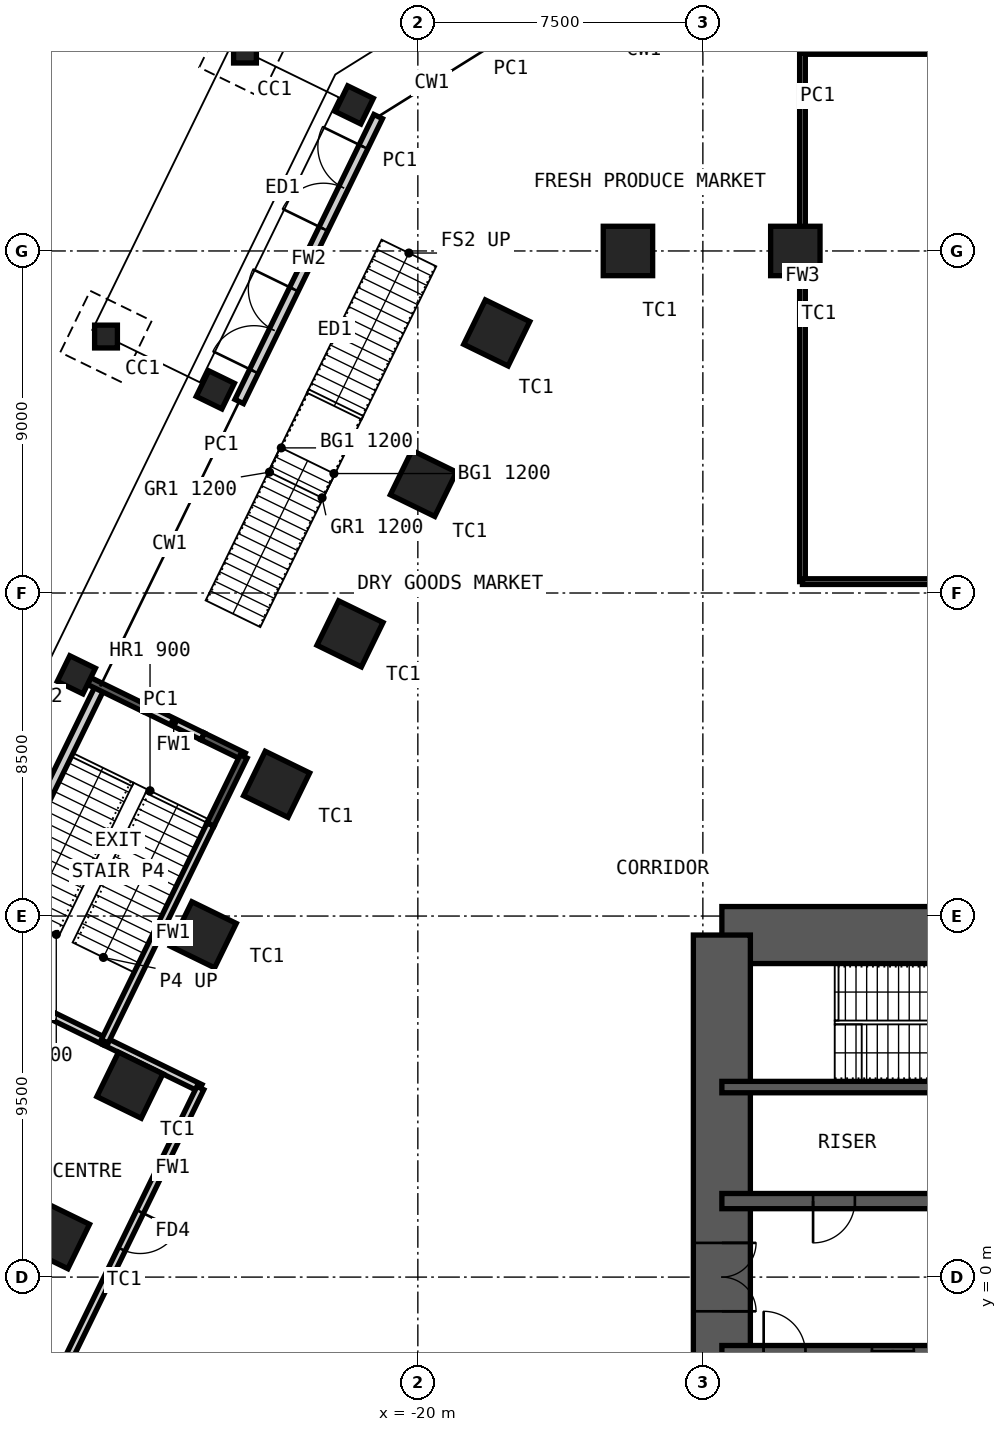
"""IFC4 building model, lengths in metres.
Left out: names, types, materials, properties, quantities, classifications, styles, units other than length and angle.
Written with IfcOpenShell. Run it as: python <this file> out.ifc"""

import sys

from ifc_helpers import new_model, si_unit, direction, frame, frame_2d, origin, origin_2d, place, context, subcontext, project, spatial, rectangle, hollow_rectangle, hollow_circle, extrude, element, fill, save


model = new_model("IFC4")
c1 = context("Model", 3, precision=1e-05, world=origin(), true_north=direction((0.0, 1.0)))
c2 = subcontext(c1, "Body", "Model", "MODEL_VIEW")
j1 = project(units=[si_unit("LENGTHUNIT", "METRE"), si_unit("PLANEANGLEUNIT", "RADIAN")], contexts=[c1])
p1 = place(None, origin())
s1 = spatial("IfcSite", under=j1, at=p1, CompositionType="ELEMENT")
p2 = place(p1, origin())
s2 = spatial("IfcBuilding", under=s1, at=p2, CompositionType="ELEMENT")
p3 = place(p2, origin())
s3 = spatial("IfcBuildingStorey", under=s2, at=p3, CompositionType="ELEMENT", Elevation=0.0)
for number, where, z_axis, x_axis in (
    (1, (-14.471, 27.0, 0.0), (0.0, 0.0, 1.0), (-1.0, 0.0, 0.0)),
    (2, (-10.067, 27.0, 0.0), (0.0, 0.0, 1.0), (-1.0, 0.0, 0.0)),
    (3, (-29.509, 1.09, 0.0), (0.0, 0.0, 1.0), (-0.438, -0.899, 0.0)),
    (4, (-27.578, 5.049, 0.0), (0.0, 0.0, 1.0), (-0.438, -0.899, 0.0)),
    (5, (-25.647, 9.008, 0.0), (0.0, 0.0, 1.0), (-0.438, -0.899, 0.0)),
    (6, (-23.716, 12.966, 0.0), (0.0, 0.0, 1.0), (-0.438, -0.899, 0.0)),
    (7, (-21.785, 16.925, 0.0), (0.0, 0.0, 1.0), (-0.438, -0.899, 0.0)),
    (8, (-19.854, 20.884, 0.0), (0.0, 0.0, 1.0), (-0.438, -0.899, 0.0)),
    (9, (-17.924, 24.843, 0.0), (0.0, 0.0, 1.0), (-0.438, -0.899, 0.0)),
):
    element("IfcColumn", number, at=place(p3, frame(where, z_axis=z_axis, x_axis=x_axis)), inside=s3, PredefinedType="COLUMN", context=c2, shape_type="SweptSolid", body=[
        extrude(hollow_rectangle(XDim=1.3, YDim=1.3, WallThickness=0.1, at=origin_2d()), origin(), (0.0, 0.0, 1.0), 6.0),
    ])
for number, where, z_axis, x_axis in (
    (10, (-28.986, 15.848, 0.0), (0.0, 0.0, 1.0), (-0.438, -0.899, 0.0)),
    (11, (-25.33, 23.345, 0.0), (0.0, 0.0, 1.0), (-0.438, -0.899, 0.0)),
    (12, (-21.673, 30.843, 0.0), (0.0, 0.0, 1.0), (-0.438, -0.899, 0.0)),
):
    element("IfcColumn", number, at=place(p3, frame(where, z_axis=z_axis, x_axis=x_axis)), inside=s3, PredefinedType="COLUMN", context=c2, shape_type="SweptSolid", body=[
        extrude(hollow_rectangle(XDim=0.75, YDim=0.75, WallThickness=0.036, at=origin_2d()), origin(), (0.0, 0.0, 1.0), 6.0),
    ])
p4 = place(p3, frame((-12.0, 9.0, 0.0), z_axis=(0.0, 0.0, 1.0), x_axis=(1.0, 0.0, 0.0)))
e13 = element("IfcWall", 13, at=p4, inside=s3, PredefinedType="SHEAR", context=c2, shape_type="SweptSolid", body=[
    extrude(rectangle(XDim=24.0, YDim=1.5, at=frame_2d((12.0, 0.0))), origin(), (0.0, 0.0, 1.0), 6.0),
])
p5 = place(p4, frame((10.4, 0.0, 0.0)))
e14 = element("IfcOpeningElement", 14, at=p5, cuts=e13, PredefinedType="OPENING", context=c2, shape_type="SweptSolid", body=[
    extrude(rectangle(XDim=1.0, YDim=2.1, at=frame_2d((0.5, 1.05))), frame((0.0, 0.76, 0.0), z_axis=(0.0, -1.0, 0.0), x_axis=(1.0, 0.0, 0.0)), (0.0, 0.0, 1.0), 1.52),
])
p6 = place(p4, frame((17.6, 0.0, 0.0)))
e15 = element("IfcOpeningElement", 15, at=p6, cuts=e13, PredefinedType="OPENING", context=c2, shape_type="SweptSolid", body=[
    extrude(rectangle(XDim=0.9, YDim=2.1, at=frame_2d((0.45, 1.05))), frame((0.0, 0.76, 0.0), z_axis=(0.0, -1.0, 0.0), x_axis=(1.0, 0.0, 0.0)), (0.0, 0.0, 1.0), 1.52),
])
p7 = place(p4, frame((21.9, 0.0, 0.0)))
e16 = element("IfcOpeningElement", 16, at=p7, cuts=e13, PredefinedType="OPENING", context=c2, shape_type="SweptSolid", body=[
    extrude(rectangle(XDim=0.9, YDim=2.1, at=frame_2d((0.45, 1.05))), frame((0.0, 0.76, 0.0), z_axis=(0.0, -1.0, 0.0), x_axis=(1.0, 0.0, 0.0)), (0.0, 0.0, 1.0), 1.52),
])
p8 = place(p3, frame((-12.0, -9.0, 0.0), z_axis=(0.0, 0.0, 1.0), x_axis=(0.0, 1.0, 0.0)))
e17 = element("IfcWall", 17, at=p8, inside=s3, PredefinedType="SHEAR", context=c2, shape_type="SweptSolid", body=[
    extrude(rectangle(XDim=18.0, YDim=1.5, at=frame_2d((9.0, 0.0))), origin(), (0.0, 0.0, 1.0), 6.0),
])
p9 = place(p8, frame((8.1, 0.0, 0.0)))
e18 = element("IfcOpeningElement", 18, at=p9, cuts=e17, PredefinedType="OPENING", context=c2, shape_type="SweptSolid", body=[
    extrude(rectangle(XDim=1.8, YDim=2.1, at=frame_2d((0.9, 1.05))), frame((0.0, 0.76, 0.0), z_axis=(0.0, -1.0, 0.0), x_axis=(1.0, 0.0, 0.0)), (0.0, 0.0, 1.0), 1.52),
])
p10 = place(p3, frame((-12.0, 5.0, 0.0), z_axis=(0.0, 0.0, 1.0), x_axis=(1.0, 0.0, 0.0)))
e19 = element("IfcWall", 19, at=p10, inside=s3, PredefinedType="SHEAR", context=c2, shape_type="SweptSolid", body=[
    extrude(rectangle(XDim=24.0, YDim=0.3, at=frame_2d((12.0, 0.0))), origin(), (0.0, 0.0, 1.0), 6.0),
])
p11 = place(p3, frame((-12.0, 2.0, 0.0), z_axis=(0.0, 0.0, 1.0), x_axis=(1.0, 0.0, 0.0)))
e20 = element("IfcWall", 20, at=p11, inside=s3, PredefinedType="SHEAR", context=c2, shape_type="SweptSolid", body=[
    extrude(rectangle(XDim=24.0, YDim=0.4, at=frame_2d((12.0, 0.0))), origin(), (0.0, 0.0, 1.0), 6.0),
])
p12 = place(p11, frame((2.4, 0.0, 0.0)))
e21 = element("IfcOpeningElement", 21, at=p12, cuts=e20, PredefinedType="OPENING", context=c2, shape_type="SweptSolid", body=[
    extrude(rectangle(XDim=1.1, YDim=2.1, at=frame_2d((0.55, 1.05))), frame((0.0, 0.21, 0.0), z_axis=(0.0, -1.0, 0.0), x_axis=(1.0, 0.0, 0.0)), (0.0, 0.0, 1.0), 0.42),
])
p13 = place(p11, frame((22.0, 0.0, 0.0)))
e22 = element("IfcOpeningElement", 22, at=p13, cuts=e20, PredefinedType="OPENING", context=c2, shape_type="SweptSolid", body=[
    extrude(rectangle(XDim=1.1, YDim=2.1, at=frame_2d((0.55, 1.05))), frame((0.0, 0.21, 0.0), z_axis=(0.0, -1.0, 0.0), x_axis=(1.0, 0.0, 0.0)), (0.0, 0.0, 1.0), 0.42),
])
p14 = place(p11, frame((10.15, 0.0, 0.0)))
e23 = element("IfcOpeningElement", 23, at=p14, cuts=e20, PredefinedType="OPENING", context=c2, shape_type="SweptSolid", body=[
    extrude(rectangle(XDim=1.0, YDim=2.1, at=frame_2d((0.5, 1.05))), frame((0.0, 0.21, 0.0), z_axis=(0.0, -1.0, 0.0), x_axis=(1.0, 0.0, 0.0)), (0.0, 0.0, 1.0), 0.42),
])
p15 = place(p11, frame((6.7, 0.0, 0.0)))
e24 = element("IfcOpeningElement", 24, at=p15, cuts=e20, PredefinedType="OPENING", context=c2, shape_type="SweptSolid", body=[
    extrude(rectangle(XDim=1.4, YDim=2.4, at=frame_2d((0.7, 1.2))), frame((0.0, 0.21, 0.0), z_axis=(0.0, -1.0, 0.0), x_axis=(1.0, 0.0, 0.0)), (0.0, 0.0, 1.0), 0.42),
])
p16 = place(p11, frame((13.35, 0.0, 0.0)))
e25 = element("IfcOpeningElement", 25, at=p16, cuts=e20, PredefinedType="OPENING", context=c2, shape_type="SweptSolid", body=[
    extrude(rectangle(XDim=1.1, YDim=2.4, at=frame_2d((0.55, 1.2))), frame((0.0, 0.21, 0.0), z_axis=(0.0, -1.0, 0.0), x_axis=(1.0, 0.0, 0.0)), (0.0, 0.0, 1.0), 0.42),
])
p17 = place(p11, frame((16.15, 0.0, 0.0)))
e26 = element("IfcOpeningElement", 26, at=p17, cuts=e20, PredefinedType="OPENING", context=c2, shape_type="SweptSolid", body=[
    extrude(rectangle(XDim=1.1, YDim=2.4, at=frame_2d((0.55, 1.2))), frame((0.0, 0.21, 0.0), z_axis=(0.0, -1.0, 0.0), x_axis=(1.0, 0.0, 0.0)), (0.0, 0.0, 1.0), 0.42),
])
p18 = place(p11, frame((18.95, 0.0, 0.0)))
e27 = element("IfcOpeningElement", 27, at=p18, cuts=e20, PredefinedType="OPENING", context=c2, shape_type="SweptSolid", body=[
    extrude(rectangle(XDim=1.1, YDim=2.4, at=frame_2d((0.55, 1.2))), frame((0.0, 0.21, 0.0), z_axis=(0.0, -1.0, 0.0), x_axis=(1.0, 0.0, 0.0)), (0.0, 0.0, 1.0), 0.42),
])
p19 = place(p3, frame((-12.0, -2.0, 0.0), z_axis=(0.0, 0.0, 1.0), x_axis=(1.0, 0.0, 0.0)))
e28 = element("IfcWall", 28, at=p19, inside=s3, PredefinedType="SHEAR", context=c2, shape_type="SweptSolid", body=[
    extrude(rectangle(XDim=24.0, YDim=0.4, at=frame_2d((12.0, 0.0))), origin(), (0.0, 0.0, 1.0), 6.0),
])
p20 = place(p19, frame((1.1, 0.0, 0.0)))
e29 = element("IfcOpeningElement", 29, at=p20, cuts=e28, PredefinedType="OPENING", context=c2, shape_type="SweptSolid", body=[
    extrude(rectangle(XDim=1.1, YDim=2.1, at=frame_2d((0.55, 1.05))), frame((0.0, 0.21, 0.0), z_axis=(0.0, -1.0, 0.0), x_axis=(1.0, 0.0, 0.0)), (0.0, 0.0, 1.0), 0.42),
])
p21 = place(p19, frame((13.55, 0.0, 0.0)))
e30 = element("IfcOpeningElement", 30, at=p21, cuts=e28, PredefinedType="OPENING", context=c2, shape_type="SweptSolid", body=[
    extrude(rectangle(XDim=1.1, YDim=2.1, at=frame_2d((0.55, 1.05))), frame((0.0, 0.21, 0.0), z_axis=(0.0, -1.0, 0.0), x_axis=(1.0, 0.0, 0.0)), (0.0, 0.0, 1.0), 0.42),
])
p22 = place(p19, frame((20.7, 0.0, 0.0)))
e31 = element("IfcOpeningElement", 31, at=p22, cuts=e28, PredefinedType="OPENING", context=c2, shape_type="SweptSolid", body=[
    extrude(rectangle(XDim=1.1, YDim=2.1, at=frame_2d((0.55, 1.05))), frame((0.0, 0.21, 0.0), z_axis=(0.0, -1.0, 0.0), x_axis=(1.0, 0.0, 0.0)), (0.0, 0.0, 1.0), 0.42),
])
p23 = place(p19, frame((3.95, 0.0, 0.0)))
e32 = element("IfcOpeningElement", 32, at=p23, cuts=e28, PredefinedType="OPENING", context=c2, shape_type="SweptSolid", body=[
    extrude(rectangle(XDim=1.1, YDim=2.4, at=frame_2d((0.55, 1.2))), frame((0.0, 0.21, 0.0), z_axis=(0.0, -1.0, 0.0), x_axis=(1.0, 0.0, 0.0)), (0.0, 0.0, 1.0), 0.42),
])
p24 = place(p19, frame((6.75, 0.0, 0.0)))
e33 = element("IfcOpeningElement", 33, at=p24, cuts=e28, PredefinedType="OPENING", context=c2, shape_type="SweptSolid", body=[
    extrude(rectangle(XDim=1.1, YDim=2.4, at=frame_2d((0.55, 1.2))), frame((0.0, 0.21, 0.0), z_axis=(0.0, -1.0, 0.0), x_axis=(1.0, 0.0, 0.0)), (0.0, 0.0, 1.0), 0.42),
])
p25 = place(p19, frame((9.55, 0.0, 0.0)))
e34 = element("IfcOpeningElement", 34, at=p25, cuts=e28, PredefinedType="OPENING", context=c2, shape_type="SweptSolid", body=[
    extrude(rectangle(XDim=1.1, YDim=2.4, at=frame_2d((0.55, 1.2))), frame((0.0, 0.21, 0.0), z_axis=(0.0, -1.0, 0.0), x_axis=(1.0, 0.0, 0.0)), (0.0, 0.0, 1.0), 0.42),
])
p26 = place(p3, frame((-9.879, 32.3, 0.0), z_axis=(0.0, 0.0, 1.0), x_axis=(1.0, 0.0, 0.0)))
e35 = element("IfcWall", 35, at=p26, inside=s3, PredefinedType="SOLIDWALL", context=c2, shape_type="SweptSolid", body=[
    extrude(rectangle(XDim=8.342, YDim=0.25, at=frame_2d((4.171, 0.0))), origin(), (0.0, 0.0, 1.0), 5.75),
])
p27 = place(p26, frame((0.885, 0.0, 0.0)))
e36 = element("IfcOpeningElement", 36, at=p27, cuts=e35, PredefinedType="OPENING", context=c2, shape_type="SweptSolid", body=[
    extrude(rectangle(XDim=2.4, YDim=3.0, at=frame_2d((1.2, 1.5))), frame((0.0, 0.135, 0.0), z_axis=(0.0, -1.0, 0.0), x_axis=(1.0, 0.0, 0.0)), (0.0, 0.0, 1.0), 0.27),
])
p28 = place(p26, frame((5.056, 0.0, 0.0)))
e37 = element("IfcOpeningElement", 37, at=p28, cuts=e35, PredefinedType="OPENING", context=c2, shape_type="SweptSolid", body=[
    extrude(rectangle(XDim=2.4, YDim=3.0, at=frame_2d((1.2, 1.5))), frame((0.0, 0.135, 0.0), z_axis=(0.0, -1.0, 0.0), x_axis=(1.0, 0.0, 0.0)), (0.0, 0.0, 1.0), 0.27),
])
p29 = place(p3, frame((-32.014, 8.043, 0.0), z_axis=(0.0, 0.0, 1.0), x_axis=(0.438364815309, 0.898797134341, 0.0)))
e38 = element("IfcWall", 38, at=p29, inside=s3, PredefinedType="SOLIDWALL", context=c2, shape_type="SweptSolid", body=[
    extrude(rectangle(XDim=8.342, YDim=0.25, at=frame_2d((4.171, 0.0))), origin(), (0.0, 0.0, 1.0), 5.75),
])
p30 = place(p29, frame((3.171, 0.0, 0.0)))
e39 = element("IfcOpeningElement", 39, at=p30, cuts=e38, PredefinedType="OPENING", context=c2, shape_type="SweptSolid", body=[
    extrude(rectangle(XDim=2.0, YDim=2.4, at=frame_2d((1.0, 1.2))), frame((0.0, 0.135, 0.0), z_axis=(0.0, -1.0, 0.0), x_axis=(1.0, 0.0, 0.0)), (0.0, 0.0, 1.0), 0.27),
])
p31 = place(p3, frame((-24.7, 23.039, 0.0), z_axis=(0.0, 0.0, 1.0), x_axis=(0.438364815309, 0.898797134341, 0.0)))
e40 = element("IfcWall", 40, at=p31, inside=s3, PredefinedType="SOLIDWALL", context=c2, shape_type="SweptSolid", body=[
    extrude(rectangle(XDim=8.342, YDim=0.25, at=frame_2d((4.171, 0.0))), origin(), (0.0, 0.0, 1.0), 5.75),
])
p32 = place(p31, frame((0.885, 0.0, 0.0)))
e41 = element("IfcOpeningElement", 41, at=p32, cuts=e40, PredefinedType="OPENING", context=c2, shape_type="SweptSolid", body=[
    extrude(rectangle(XDim=2.4, YDim=3.0, at=frame_2d((1.2, 1.5))), frame((0.0, 0.135, 0.0), z_axis=(0.0, -1.0, 0.0), x_axis=(1.0, 0.0, 0.0)), (0.0, 0.0, 1.0), 0.27),
])
p33 = place(p31, frame((5.056, 0.0, 0.0)))
e42 = element("IfcOpeningElement", 42, at=p33, cuts=e40, PredefinedType="OPENING", context=c2, shape_type="SweptSolid", body=[
    extrude(rectangle(XDim=2.4, YDim=3.0, at=frame_2d((1.2, 1.5))), frame((0.0, 0.135, 0.0), z_axis=(0.0, -1.0, 0.0), x_axis=(1.0, 0.0, 0.0)), (0.0, 0.0, 1.0), 0.27),
])
p34 = place(p3, frame((-9.879, 32.2, 0.0), z_axis=(0.0, 0.0, 1.0), x_axis=(0.0, -1.0, 0.0)))
e43 = element("IfcWall", 43, at=p34, inside=s3, PredefinedType="PARTITIONING", context=c2, shape_type="SweptSolid", body=[
    extrude(rectangle(XDim=13.9, YDim=0.15, at=frame_2d((6.95, 0.0))), origin(), (0.0, 0.0, 1.0), 5.75),
])
p35 = place(p3, frame((-9.879, 18.3, 0.0), z_axis=(0.0, 0.0, 1.0), x_axis=(1.0, 0.0, 0.0)))
e44 = element("IfcWall", 44, at=p35, inside=s3, PredefinedType="PARTITIONING", context=c2, shape_type="SweptSolid", body=[
    extrude(rectangle(XDim=16.684, YDim=0.15, at=frame_2d((8.342, 0.0))), origin(), (0.0, 0.0, 1.0), 5.75),
])
p36 = place(p35, frame((7.442, 0.0, 0.0)))
e45 = element("IfcOpeningElement", 45, at=p36, cuts=e44, PredefinedType="OPENING", context=c2, shape_type="SweptSolid", body=[
    extrude(rectangle(XDim=1.8, YDim=2.1, at=frame_2d((0.9, 1.05))), frame((0.0, 0.085, 0.0), z_axis=(0.0, -1.0, 0.0), x_axis=(1.0, 0.0, 0.0)), (0.0, 0.0, 1.0), 0.17),
])
p37 = place(p3, frame((-35.581, 0.502, 0.0), z_axis=(0.0, 0.0, 1.0), x_axis=(0.898799388667, -0.438360193142, 0.0)))
e46 = element("IfcWall", 46, at=p37, inside=s3, PredefinedType="PARTITIONING", context=c2, shape_type="SweptSolid", body=[
    extrude(rectangle(XDim=6.9, YDim=0.2, at=frame_2d((3.45, 0.0))), origin(), (0.0, 0.0, 1.0), 5.75),
])
p38 = place(p3, frame((-28.239, 6.202, 0.0), z_axis=(0.0, 0.0, 1.0), x_axis=(0.898812855928, -0.438332579235, 0.0)))
e47 = element("IfcWall", 47, at=p38, inside=s3, PredefinedType="PARTITIONING", context=c2, shape_type="SweptSolid", body=[
    extrude(rectangle(XDim=2.8, YDim=0.2, at=frame_2d((1.4, 0.0))), origin(), (0.0, 0.0, 1.0), 5.75),
])
p39 = place(p3, frame((-29.379, -2.523, 0.0), z_axis=(0.0, 0.0, 1.0), x_axis=(0.438364815309, 0.898797134341, 0.0)))
e48 = element("IfcWall", 48, at=p39, inside=s3, PredefinedType="PARTITIONING", context=c2, shape_type="SweptSolid", body=[
    extrude(rectangle(XDim=8.342, YDim=0.2, at=frame_2d((4.171, 0.0))), origin(), (0.0, 0.0, 1.0), 5.75),
])
p40 = place(p39, frame((3.621, 0.0, 0.0)))
e49 = element("IfcOpeningElement", 49, at=p40, cuts=e48, PredefinedType="OPENING", context=c2, shape_type="SweptSolid", body=[
    extrude(rectangle(XDim=1.1, YDim=2.1, at=frame_2d((0.55, 1.05))), frame((0.0, 0.11, 0.0), z_axis=(0.0, -1.0, 0.0), x_axis=(1.0, 0.0, 0.0)), (0.0, 0.0, 1.0), 0.22),
])
p41 = place(p3, frame((-31.924, 8.0, 0.0), z_axis=(0.0, 0.0, 1.0), x_axis=(0.898790191345, -0.438379050529, 0.0)))
e50 = element("IfcWall", 50, at=p41, inside=s3, PredefinedType="PARTITIONING", context=c2, shape_type="SweptSolid", body=[
    extrude(rectangle(XDim=4.1, YDim=0.2, at=frame_2d((2.05, 0.0))), origin(), (0.0, 0.0, 1.0), 5.75),
])
p42 = place(p3, frame((-28.649, 15.683, 0.0), z_axis=(0.0, 0.0, 1.0), x_axis=(0.898859390649, -0.438237145667, 0.0)))
e51 = element("IfcWall", 51, at=p42, inside=s3, PredefinedType="PARTITIONING", context=c2, shape_type="SweptSolid", body=[
    extrude(rectangle(XDim=1.625, YDim=0.2, at=frame_2d((0.812, 0.0))), origin(), (0.0, 0.0, 1.0), 5.75),
])
p43 = place(p3, frame((-28.239, 6.202, 0.0), z_axis=(0.0, 0.0, 1.0), x_axis=(0.438364548315, 0.89879726456, 0.0)))
e52 = element("IfcWall", 52, at=p43, inside=s3, PredefinedType="PARTITIONING", context=c2, shape_type="SweptSolid", body=[
    extrude(rectangle(XDim=6.35, YDim=0.2, at=frame_2d((3.175, 0.0))), origin(), (0.0, 0.0, 1.0), 5.75),
])
p44 = place(p3, frame((-27.189, 14.971, 0.0), z_axis=(0.0, 0.0, 1.0), x_axis=(0.898750501486, -0.438460415634, 0.0)))
e53 = element("IfcWall", 53, at=p44, inside=s3, PredefinedType="PARTITIONING", context=c2, shape_type="SweptSolid", body=[
    extrude(rectangle(XDim=1.7, YDim=0.2, at=frame_2d((0.85, 0.0))), origin(), (0.0, 0.0, 1.0), 5.75),
])
p45 = place(p3, frame((-25.661, 14.226, 0.0), z_axis=(0.0, 0.0, 1.0), x_axis=(0.898778221275, -0.43840359141, 0.0)))
e54 = element("IfcWall", 54, at=p45, inside=s3, PredefinedType="PARTITIONING", context=c2, shape_type="SweptSolid", body=[
    extrude(rectangle(XDim=1.2, YDim=0.2, at=frame_2d((0.6, 0.0))), origin(), (0.0, 0.0, 1.0), 5.75),
])
p46 = place(p3, frame((-25.455, 11.91, 0.0), z_axis=(0.0, 0.0, 1.0), x_axis=(0.438365666617, 0.898796719137, 0.0)))
e55 = element("IfcWall", 55, at=p46, inside=s3, PredefinedType="PARTITIONING", context=c2, shape_type="SweptSolid", body=[
    extrude(rectangle(XDim=1.992, YDim=0.2, at=frame_2d((0.996, 0.0))), origin(), (0.0, 0.0, 1.0), 5.75),
])
for number, where, z_axis, x_axis in (
    (56, (-28.206, 24.748, -0.3), (0.0, 0.0, 1.0), (1.0, 0.0, 0.0)),
    (57, (-24.549, 32.246, -0.3), (0.0, 0.0, 1.0), (1.0, 0.0, 0.0)),
):
    element("IfcColumn", number, at=place(p3, frame(where, z_axis=z_axis, x_axis=x_axis)), inside=s3, PredefinedType="COLUMN", context=c2, shape_type="SweptSolid", body=[
        extrude(hollow_circle(Radius=0.162, WallThickness=0.012, at=origin_2d()), origin(), (0.0, 0.0, 1.0), 4.46),
    ])
p47 = place(p32, origin())
e58 = element("IfcDoor", 58, at=p47, inside=s3, OperationType="DOUBLE_DOOR_DOUBLE_SWING", PredefinedType="DOOR", context=c2, shape_type="SweptSolid", body=[
    extrude(rectangle(XDim=2.4, YDim=3.0, at=frame_2d((1.2, 1.5))), frame((0.0, 0.025, 0.0), z_axis=(0.0, -1.0, 0.0), x_axis=(1.0, 0.0, 0.0)), (0.0, 0.0, 1.0), 0.05),
])
fill(e41, e58)
p48 = place(p33, origin())
e59 = element("IfcDoor", 59, at=p48, inside=s3, OperationType="DOUBLE_DOOR_DOUBLE_SWING", PredefinedType="DOOR", context=c2, shape_type="SweptSolid", body=[
    extrude(rectangle(XDim=2.4, YDim=3.0, at=frame_2d((1.2, 1.5))), frame((0.0, 0.025, 0.0), z_axis=(0.0, -1.0, 0.0), x_axis=(1.0, 0.0, 0.0)), (0.0, 0.0, 1.0), 0.05),
])
fill(e42, e59)
p49 = place(p12, origin())
e60 = element("IfcDoor", 60, at=p49, inside=s3, OperationType="SINGLE_SWING_LEFT", PredefinedType="DOOR", context=c2, shape_type="SweptSolid", body=[
    extrude(rectangle(XDim=1.1, YDim=2.1, at=frame_2d((0.55, 1.05))), frame((0.0, 0.025, 0.0), z_axis=(0.0, -1.0, 0.0), x_axis=(1.0, 0.0, 0.0)), (0.0, 0.0, 1.0), 0.05),
])
fill(e21, e60)
p50 = place(p20, origin())
e61 = element("IfcDoor", 61, at=p50, inside=s3, OperationType="SINGLE_SWING_RIGHT", PredefinedType="DOOR", context=c2, shape_type="SweptSolid", body=[
    extrude(rectangle(XDim=1.1, YDim=2.1, at=frame_2d((0.55, 1.05))), frame((0.0, 0.025, 0.0), z_axis=(0.0, -1.0, 0.0), x_axis=(1.0, 0.0, 0.0)), (0.0, 0.0, 1.0), 0.05),
])
fill(e29, e61)
p51 = place(p9, origin())
e62 = element("IfcDoor", 62, at=p51, inside=s3, OperationType="DOUBLE_DOOR_DOUBLE_SWING", PredefinedType="DOOR", context=c2, shape_type="SweptSolid", body=[
    extrude(rectangle(XDim=1.8, YDim=2.1, at=frame_2d((0.9, 1.05))), frame((0.0, 0.025, 0.0), z_axis=(0.0, -1.0, 0.0), x_axis=(1.0, 0.0, 0.0)), (0.0, 0.0, 1.0), 0.05),
])
fill(e18, e62)
p52 = place(p23, origin())
e63 = element("IfcDoor", 63, at=p52, inside=s3, OperationType="DOUBLE_DOOR_SLIDING", PredefinedType="DOOR", context=c2, shape_type="SweptSolid", body=[
    extrude(rectangle(XDim=1.1, YDim=2.4, at=frame_2d((0.55, 1.2))), frame((0.0, 0.025, 0.0), z_axis=(0.0, -1.0, 0.0), x_axis=(1.0, 0.0, 0.0)), (0.0, 0.0, 1.0), 0.05),
])
fill(e32, e63)
p53 = place(p40, origin())
e64 = element("IfcDoor", 64, at=p53, inside=s3, OperationType="SINGLE_SWING_RIGHT", PredefinedType="DOOR", context=c2, shape_type="SweptSolid", body=[
    extrude(rectangle(XDim=1.1, YDim=2.1, at=frame_2d((0.55, 1.05))), frame((0.0, 0.025, 0.0), z_axis=(0.0, -1.0, 0.0), x_axis=(1.0, 0.0, 0.0)), (0.0, 0.0, 1.0), 0.05),
])
fill(e49, e64)
save(model, sys.argv[1])
